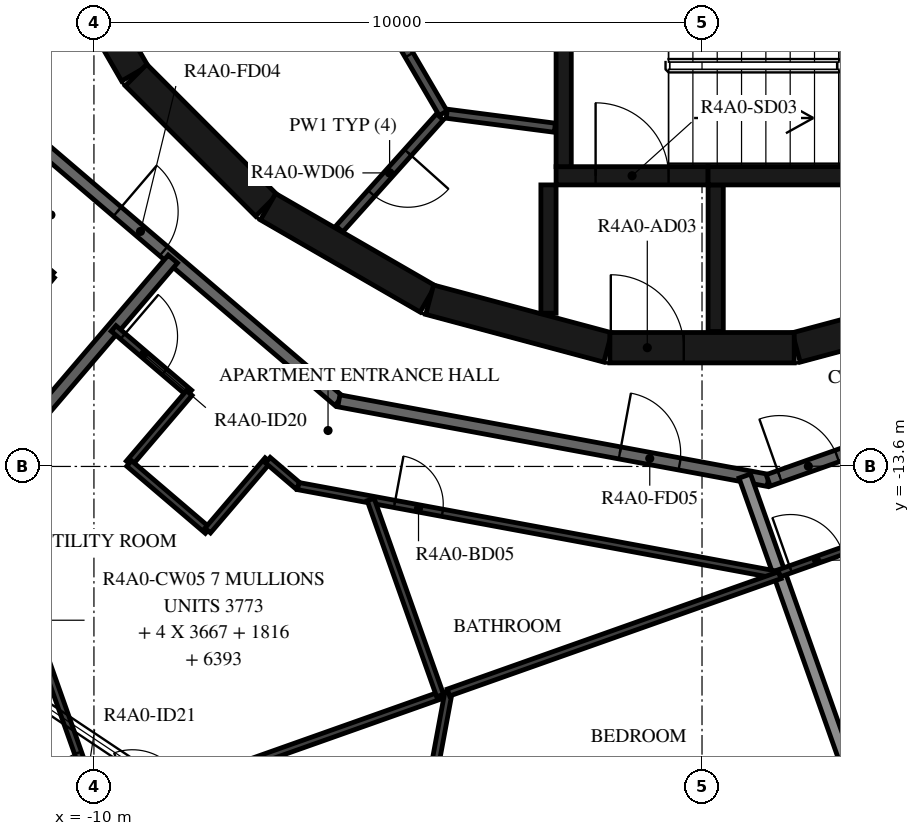
"""IFC4 building model, lengths in metres.
Left out: names, types, materials, properties, quantities, classifications, styles, units other than length and angle.
Written with IfcOpenShell. Run it as: python <this file> out.ifc"""

import sys

from ifc_helpers import new_model, si_unit, direction, frame, frame_2d, origin, place, context, subcontext, project, spatial, rectangle, extrude, element, fill, save


model = new_model("IFC4")
c1 = context("Model", 3, precision=1e-05, world=origin(), true_north=direction((0.0, 1.0)))
c2 = subcontext(c1, "Body", "Model", "MODEL_VIEW")
j1 = project(units=[si_unit("LENGTHUNIT", "METRE"), si_unit("PLANEANGLEUNIT", "RADIAN")], contexts=[c1])
p1 = place(None, origin())
s1 = spatial("IfcSite", under=j1, at=p1, CompositionType="ELEMENT")
p2 = place(p1, origin())
s2 = spatial("IfcBuilding", under=s1, at=p2, CompositionType="ELEMENT")
p3 = place(p2, frame((0.0, 0.0, 158.7)))
s3 = spatial("IfcBuildingStorey", under=s2, at=p3, CompositionType="ELEMENT", Elevation=158.7)
for number, where, z_axis, x_axis in (
    (1, (1.55, -11.643, 0.0), (0.0, 0.0, 1.0), (0.966, 0.259, 0.0)),
    (2, (-10.845, -4.51, 0.0), (0.0, 0.0, 1.0), (0.5, -0.866, 0.0)),
):
    element("IfcWall", number, at=place(p3, frame(where, z_axis=z_axis, x_axis=x_axis)), inside=s3, PredefinedType="SHEAR", context=c2, shape_type="SweptSolid", body=[
        extrude(rectangle(XDim=3.033, YDim=0.5, at=frame_2d((1.516, 0.0))), origin(), (0.0, 0.0, 1.0), 3.12),
    ])
p4 = place(p3, frame((-9.308, -7.164, 0.0), z_axis=(0.0, 0.0, 1.0), x_axis=(0.707106781187, -0.707106781187, 0.0)))
e3 = element("IfcWall", 3, at=p4, inside=s3, PredefinedType="SHEAR", context=c2, shape_type="SweptSolid", body=[
    extrude(rectangle(XDim=3.032, YDim=0.5, at=frame_2d((1.516, 0.0))), origin(), (0.0, 0.0, 1.0), 3.12),
])
for number, where, z_axis, x_axis in (
    (4, (-7.137, -9.329, 0.0), (0.0, 0.0, 1.0), (0.866, -0.5, 0.0)),
    (5, (-4.479, -10.858, 0.0), (0.0, 0.0, 1.0), (0.966, -0.259, 0.0)),
):
    element("IfcWall", number, at=place(p3, frame(where, z_axis=z_axis, x_axis=x_axis)), inside=s3, PredefinedType="SHEAR", context=c2, shape_type="SweptSolid", body=[
        extrude(rectangle(XDim=3.033, YDim=0.5, at=frame_2d((1.516, 0.0))), origin(), (0.0, 0.0, 1.0), 3.12),
    ])
p5 = place(p3, frame((-1.516, -11.647, 0.0), z_axis=(0.0, 0.0, 1.0), x_axis=(1.0, 0.0, 0.0)))
e6 = element("IfcWall", 6, at=p5, inside=s3, PredefinedType="SHEAR", context=c2, shape_type="SweptSolid", body=[
    extrude(rectangle(XDim=3.033, YDim=0.5, at=frame_2d((1.516, 0.0))), origin(), (0.0, 0.0, 1.0), 3.12),
])
p6 = place(p5, frame((0.016, 0.0, 0.0)))
e7 = element("IfcOpeningElement", 7, at=p6, cuts=e6, PredefinedType="OPENING", context=c2, shape_type="SweptSolid", body=[
    extrude(rectangle(XDim=1.2, YDim=2.1, at=frame_2d((0.6, 1.05))), frame((0.0, 0.26, 0.0), z_axis=(0.0, -1.0, 0.0), x_axis=(1.0, 0.0, 0.0)), (0.0, 0.0, 1.0), 0.52),
])
p7 = place(p3, frame((-2.275, -8.67, 0.0), z_axis=(0.0, 0.0, 1.0), x_axis=(0.0, 1.0, 0.0)))
e8 = element("IfcWall", 8, at=p7, inside=s3, PredefinedType="SHEAR", context=c2, shape_type="SweptSolid", body=[
    extrude(rectangle(XDim=3.32, YDim=0.25, at=frame_2d((1.66, 0.0))), origin(), (0.0, 0.0, 1.0), 3.12),
])
p8 = place(p3, frame((0.1, -8.82, 0.0), z_axis=(0.0, 0.0, 1.0), x_axis=(1.0, 0.0, 0.0)))
e9 = element("IfcWall", 9, at=p8, inside=s3, PredefinedType="SHEAR", context=c2, shape_type="SweptSolid", body=[
    extrude(rectangle(XDim=4.55, YDim=0.3, at=frame_2d((2.275, 0.0))), origin(), (0.0, 0.0, 1.0), 3.12),
])
p9 = place(p3, frame((-2.4, -8.82, 0.0), z_axis=(0.0, 0.0, 1.0), x_axis=(1.0, 0.0, 0.0)))
e10 = element("IfcWall", 10, at=p9, inside=s3, PredefinedType="SHEAR", context=c2, shape_type="SweptSolid", body=[
    extrude(rectangle(XDim=2.5, YDim=0.3, at=frame_2d((1.25, 0.0))), origin(), (0.0, 0.0, 1.0), 3.12),
])
p10 = place(p9, frame((0.65, 0.0, 0.0)))
e11 = element("IfcOpeningElement", 11, at=p10, cuts=e10, PredefinedType="OPENING", context=c2, shape_type="SweptSolid", body=[
    extrude(rectangle(XDim=1.2, YDim=2.1, at=frame_2d((0.6, 1.05))), frame((0.0, 0.16, 0.0), z_axis=(0.0, -1.0, 0.0), x_axis=(1.0, 0.0, 0.0)), (0.0, 0.0, 1.0), 0.32),
])
p11 = place(p3, frame((-2.525, -8.97, 0.0), z_axis=(0.0, 0.0, 1.0), x_axis=(0.0, -1.0, 0.0)))
e12 = element("IfcWall", 12, at=p11, inside=s3, PredefinedType="SHEAR", context=c2, shape_type="SweptSolid", body=[
    extrude(rectangle(XDim=2.11, YDim=0.25, at=frame_2d((1.055, 0.0))), origin(), (0.0, 0.0, 1.0), 3.12),
])
p12 = place(p3, frame((0.225, -8.97, 0.0), z_axis=(0.0, 0.0, 1.0), x_axis=(0.0, -1.0, 0.0)))
e13 = element("IfcWall", 13, at=p12, inside=s3, PredefinedType="SHEAR", context=c2, shape_type="SweptSolid", body=[
    extrude(rectangle(XDim=2.41, YDim=0.25, at=frame_2d((1.205, 0.0))), origin(), (0.0, 0.0, 1.0), 3.12),
])
p13 = place(p3, frame((-5.829, -5.102, 0.0), z_axis=(0.0, 0.0, 1.0), x_axis=(0.504480008384, -0.863423373057, 0.0)))
e14 = element("IfcWall", 14, at=p13, inside=s3, PredefinedType="PARTITIONING", context=c2, shape_type="SweptSolid", body=[
    extrude(rectangle(XDim=3.115, YDim=0.15, at=frame_2d((1.558, 0.0))), origin(), (0.0, 0.0, 1.0), 3.12),
])
p14 = place(p13, frame((1.107, 0.0, 0.0)))
e15 = element("IfcOpeningElement", 15, at=p14, cuts=e14, PredefinedType="OPENING", context=c2, shape_type="SweptSolid", body=[
    extrude(rectangle(XDim=0.9, YDim=2.1, at=frame_2d((0.45, 1.05))), frame((0.0, 0.085, 0.0), z_axis=(0.0, -1.0, 0.0), x_axis=(1.0, 0.0, 0.0)), (0.0, 0.0, 1.0), 0.17),
])
p15 = place(p3, frame((-4.311, -7.851, 0.0), z_axis=(0.0, 0.0, 1.0), x_axis=(-0.667869133096, -0.744278725383, 0.0)))
e16 = element("IfcWall", 16, at=p15, inside=s3, PredefinedType="PARTITIONING", context=c2, shape_type="SweptSolid", body=[
    extrude(rectangle(XDim=2.476, YDim=0.15, at=frame_2d((1.238, 0.0))), origin(), (0.0, 0.0, 1.0), 3.12),
])
p16 = place(p15, frame((0.788, 0.0, 0.0)))
e17 = element("IfcOpeningElement", 17, at=p16, cuts=e16, PredefinedType="OPENING", context=c2, shape_type="SweptSolid", body=[
    extrude(rectangle(XDim=0.9, YDim=2.1, at=frame_2d((0.45, 1.05))), frame((0.0, 0.085, 0.0), z_axis=(0.0, -1.0, 0.0), x_axis=(1.0, 0.0, 0.0)), (0.0, 0.0, 1.0), 0.17),
])
p17 = place(p3, frame((-4.198, -7.799, 0.0), z_axis=(0.0, 0.0, 1.0), x_axis=(0.991686747293, -0.128675542523, 0.0)))
e18 = element("IfcWall", 18, at=p17, inside=s3, PredefinedType="PARTITIONING", context=c2, shape_type="SweptSolid", body=[
    extrude(rectangle(XDim=1.793, YDim=0.15, at=frame_2d((0.896, 0.0))), origin(), (0.0, 0.0, 1.0), 3.12),
])
p18 = place(p3, frame((-10.303, -5.949, 0.0), z_axis=(0.0, 0.0, 1.0), x_axis=(-0.866021168401, -0.500007335828, 0.0)))
e19 = element("IfcWall", 19, at=p18, inside=s3, PredefinedType="STANDARD", context=c2, shape_type="SweptSolid", body=[
    extrude(rectangle(XDim=1.731, YDim=0.2, at=frame_2d((0.865, 0.0))), origin(), (0.0, 0.0, 1.0), 3.12),
])
p19 = place(p3, frame((-11.433, -7.858, 0.0), z_axis=(0.0, 0.0, 1.0), x_axis=(0.760412154545, -0.649440801937, 0.0)))
e20 = element("IfcWall", 20, at=p19, inside=s3, PredefinedType="STANDARD", context=c2, shape_type="SweptSolid", body=[
    extrude(rectangle(XDim=7.181, YDim=0.2, at=frame_2d((3.59, 0.0))), origin(), (0.0, 0.0, 1.0), 3.12),
])
p20 = place(p19, frame((2.39, 0.0, 0.0)))
e21 = element("IfcOpeningElement", 21, at=p20, cuts=e20, PredefinedType="OPENING", context=c2, shape_type="SweptSolid", body=[
    extrude(rectangle(XDim=1.0, YDim=2.1, at=frame_2d((0.5, 1.05))), frame((0.0, 0.11, 0.0), z_axis=(0.0, -1.0, 0.0), x_axis=(1.0, 0.0, 0.0)), (0.0, 0.0, 1.0), 0.22),
])
p21 = place(p3, frame((-5.972, -12.521, 0.0), z_axis=(0.0, 0.0, 1.0), x_axis=(0.983256068163, -0.18222926335, 0.0)))
e22 = element("IfcWall", 22, at=p21, inside=s3, PredefinedType="STANDARD", context=c2, shape_type="SweptSolid", body=[
    extrude(rectangle(XDim=7.181, YDim=0.2, at=frame_2d((3.59, 0.0))), origin(), (0.0, 0.0, 1.0), 3.12),
])
p22 = place(p21, frame((4.7, 0.0, 0.0)))
e23 = element("IfcOpeningElement", 23, at=p22, cuts=e22, PredefinedType="OPENING", context=c2, shape_type="SweptSolid", body=[
    extrude(rectangle(XDim=1.0, YDim=2.1, at=frame_2d((0.5, 1.05))), frame((0.0, 0.11, 0.0), z_axis=(0.0, -1.0, 0.0), x_axis=(1.0, 0.0, 0.0)), (0.0, 0.0, 1.0), 0.22),
])
p23 = place(p3, frame((1.088, -13.83, 0.0), z_axis=(0.0, 0.0, 1.0), x_axis=(0.942648397945, 0.333787354241, 0.0)))
e24 = element("IfcWall", 24, at=p23, inside=s3, PredefinedType="STANDARD", context=c2, shape_type="SweptSolid", body=[
    extrude(rectangle(XDim=7.181, YDim=0.2, at=frame_2d((3.591, 0.0))), origin(), (0.0, 0.0, 1.0), 3.12),
])
p24 = place(p23, frame((0.2, 0.0, 0.0)))
e25 = element("IfcOpeningElement", 25, at=p24, cuts=e24, PredefinedType="OPENING", context=c2, shape_type="SweptSolid", body=[
    extrude(rectangle(XDim=1.0, YDim=2.1, at=frame_2d((0.5, 1.05))), frame((0.0, 0.11, 0.0), z_axis=(0.0, -1.0, 0.0), x_axis=(1.0, 0.0, 0.0)), (0.0, 0.0, 1.0), 0.22),
])
p25 = place(p3, frame((-11.838, -13.86, 0.0), z_axis=(0.0, 0.0, 1.0), x_axis=(0.64944503311, 0.760408540831, 0.0)))
e26 = element("IfcWall", 26, at=p25, inside=s3, PredefinedType="STANDARD", context=c2, shape_type="SweptSolid", body=[
    extrude(rectangle(XDim=4.827, YDim=0.2, at=frame_2d((2.414, 0.0))), origin(), (0.0, 0.0, 1.0), 3.12),
])
p26 = place(p3, frame((2.482, -18.782, 0.0), z_axis=(0.0, 0.0, 1.0), x_axis=(-0.333807281402, 0.942641341594, 0.0)))
e27 = element("IfcWall", 27, at=p26, inside=s3, PredefinedType="STANDARD", context=c2, shape_type="SweptSolid", body=[
    extrude(rectangle(XDim=5.329, YDim=0.2, at=frame_2d((2.665, 0.0))), origin(), (0.0, 0.0, 1.0), 2.73),
])
p27 = place(p3, frame((-12.713, -8.737, 0.0), z_axis=(0.0, 0.0, 1.0), x_axis=(0.760400223405, -0.649454771517, 0.0)))
e28 = element("IfcWall", 28, at=p27, inside=s3, PredefinedType="PARTITIONING", context=c2, shape_type="SweptSolid", body=[
    extrude(rectangle(XDim=2.649, YDim=0.12, at=frame_2d((1.325, 0.0))), origin(), (0.0, 0.0, 1.0), 3.12),
])
p28 = place(p3, frame((-10.698, -10.458, 0.0), z_axis=(0.0, 0.0, 1.0), x_axis=(-0.63830561059, -0.769783052223, 0.0)))
e29 = element("IfcWall", 29, at=p28, inside=s3, PredefinedType="PARTITIONING", context=c2, shape_type="SweptSolid", body=[
    extrude(rectangle(XDim=5.131, YDim=0.12, at=frame_2d((2.565, 0.0))), origin(), (0.0, 0.0, 1.0), 3.12),
])
p29 = place(p28, frame((2.363, 0.0, 0.0)))
e30 = element("IfcOpeningElement", 30, at=p29, cuts=e29, PredefinedType="OPENING", context=c2, shape_type="SweptSolid", body=[
    extrude(rectangle(XDim=0.8, YDim=2.1, at=frame_2d((0.4, 1.05))), frame((0.0, 0.07, 0.0), z_axis=(0.0, -1.0, 0.0), x_axis=(1.0, 0.0, 0.0)), (0.0, 0.0, 1.0), 0.14),
])
p30 = place(p3, frame((-9.677, -11.33, 0.0), z_axis=(0.0, 0.0, 1.0), x_axis=(0.760372142735, -0.649487647729, 0.0)))
e31 = element("IfcWall", 31, at=p30, inside=s3, PredefinedType="PARTITIONING", context=c2, shape_type="SweptSolid", body=[
    extrude(rectangle(XDim=1.636, YDim=0.12, at=frame_2d((0.818, 0.0))), origin(), (0.0, 0.0, 1.0), 3.12),
])
p31 = place(p30, frame((0.2, 0.0, 0.0)))
e32 = element("IfcOpeningElement", 32, at=p31, cuts=e31, PredefinedType="OPENING", context=c2, shape_type="SweptSolid", body=[
    extrude(rectangle(XDim=0.9, YDim=2.1, at=frame_2d((0.45, 1.05))), frame((0.0, 0.07, 0.0), z_axis=(0.0, -1.0, 0.0), x_axis=(1.0, 0.0, 0.0)), (0.0, 0.0, 1.0), 0.14),
])
p32 = place(p3, frame((-8.433, -12.393, 0.0), z_axis=(0.0, 0.0, 1.0), x_axis=(-0.649443355674, -0.760409973482, 0.0)))
e33 = element("IfcWall", 33, at=p32, inside=s3, PredefinedType="PARTITIONING", context=c2, shape_type="SweptSolid", body=[
    extrude(rectangle(XDim=1.522, YDim=0.12, at=frame_2d((0.761, 0.0))), origin(), (0.0, 0.0, 1.0), 3.12),
])
p33 = place(p3, frame((-9.422, -13.55, 0.0), z_axis=(0.0, 0.0, 1.0), x_axis=(0.760431300628, -0.649418383652, 0.0)))
e34 = element("IfcWall", 34, at=p33, inside=s3, PredefinedType="PARTITIONING", context=c2, shape_type="SweptSolid", body=[
    extrude(rectangle(XDim=1.7, YDim=0.12, at=frame_2d((0.85, 0.0))), origin(), (0.0, 0.0, 1.0), 3.12),
])
p34 = place(p3, frame((-8.129, -14.654, 0.0), z_axis=(0.0, 0.0, 1.0), x_axis=(0.649443355674, 0.760409973482, 0.0)))
e35 = element("IfcWall", 35, at=p34, inside=s3, PredefinedType="PARTITIONING", context=c2, shape_type="SweptSolid", body=[
    extrude(rectangle(XDim=1.522, YDim=0.12, at=frame_2d((0.761, 0.0))), origin(), (0.0, 0.0, 1.0), 3.12),
])
p35 = place(p3, frame((-7.14, -13.497, 0.0), z_axis=(0.0, 0.0, 1.0), x_axis=(0.760515230334, -0.649320093967, 0.0)))
e36 = element("IfcWall", 36, at=p35, inside=s3, PredefinedType="PARTITIONING", context=c2, shape_type="SweptSolid", body=[
    extrude(rectangle(XDim=0.656, YDim=0.12, at=frame_2d((0.328, 0.0))), origin(), (0.0, 0.0, 1.0), 3.12),
])
p36 = place(p3, frame((-6.641, -13.923, 0.0), z_axis=(0.0, 0.0, 1.0), x_axis=(0.983250157272, -0.182261153912, 0.0)))
e37 = element("IfcWall", 37, at=p36, inside=s3, PredefinedType="PARTITIONING", context=c2, shape_type="SweptSolid", body=[
    extrude(rectangle(XDim=7.985, YDim=0.12, at=frame_2d((3.992, 0.0))), origin(), (0.0, 0.0, 1.0), 3.12),
])
p37 = place(p36, frame((1.612, 0.0, 0.0)))
e38 = element("IfcOpeningElement", 38, at=p37, cuts=e37, PredefinedType="OPENING", context=c2, shape_type="SweptSolid", body=[
    extrude(rectangle(XDim=0.8, YDim=2.1, at=frame_2d((0.4, 1.05))), frame((0.0, 0.07, 0.0), z_axis=(0.0, -1.0, 0.0), x_axis=(1.0, 0.0, 0.0)), (0.0, 0.0, 1.0), 0.14),
])
p38 = place(p3, frame((-9.895, -19.346, 0.0), z_axis=(0.0, 0.0, 1.0), x_axis=(-0.333781129158, 0.942650602195, 0.0)))
e39 = element("IfcWall", 39, at=p38, inside=s3, PredefinedType="PARTITIONING", context=c2, shape_type="SweptSolid", body=[
    extrude(rectangle(XDim=5.819, YDim=0.12, at=frame_2d((2.91, 0.0))), origin(), (0.0, 0.0, 1.0), 3.12),
])
p39 = place(p38, frame((0.2, 0.0, 0.0)))
e40 = element("IfcOpeningElement", 40, at=p39, cuts=e39, PredefinedType="OPENING", context=c2, shape_type="SweptSolid", body=[
    extrude(rectangle(XDim=0.9, YDim=2.1, at=frame_2d((0.45, 1.05))), frame((0.0, 0.07, 0.0), z_axis=(0.0, -1.0, 0.0), x_axis=(1.0, 0.0, 0.0)), (0.0, 0.0, 1.0), 0.14),
])
p40 = place(p3, frame((-12.015, -20.096, 0.0), z_axis=(0.0, 0.0, 1.0), x_axis=(0.942638718556, 0.333814688531, 0.0)))
e41 = element("IfcWall", 41, at=p40, inside=s3, PredefinedType="PARTITIONING", context=c2, shape_type="SweptSolid", body=[
    extrude(rectangle(XDim=8.216, YDim=0.12, at=frame_2d((4.108, 0.0))), origin(), (0.0, 0.0, 1.0), 3.12),
])
p41 = place(p40, frame((2.809, 0.0, 0.0)))
e42 = element("IfcOpeningElement", 42, at=p41, cuts=e41, PredefinedType="OPENING", context=c2, shape_type="SweptSolid", body=[
    extrude(rectangle(XDim=0.9, YDim=2.1, at=frame_2d((0.45, 1.05))), frame((0.0, 0.07, 0.0), z_axis=(0.0, -1.0, 0.0), x_axis=(1.0, 0.0, 0.0)), (0.0, 0.0, 1.0), 0.14),
])
p42 = place(p40, frame((0.2, 0.0, 0.0)))
e43 = element("IfcOpeningElement", 43, at=p42, cuts=e41, PredefinedType="OPENING", context=c2, shape_type="SweptSolid", body=[
    extrude(rectangle(XDim=0.9, YDim=2.1, at=frame_2d((0.45, 1.05))), frame((0.0, 0.07, 0.0), z_axis=(0.0, -1.0, 0.0), x_axis=(1.0, 0.0, 0.0)), (0.0, 0.0, 1.0), 0.14),
])
p43 = place(p3, frame((-4.308, -17.367, 0.0), z_axis=(0.0, 0.0, 1.0), x_axis=(-0.333802202677, 0.942643140052, 0.0)))
e44 = element("IfcWall", 44, at=p43, inside=s3, PredefinedType="PARTITIONING", context=c2, shape_type="SweptSolid", body=[
    extrude(rectangle(XDim=3.419, YDim=0.12, at=frame_2d((1.709, 0.0))), origin(), (0.0, 0.0, 1.0), 3.12),
])
p44 = place(p3, frame((-4.927, -21.406, 0.0), z_axis=(0.0, 0.0, 1.0), x_axis=(0.182238575099, 0.983254342348, 0.0)))
e45 = element("IfcWall", 45, at=p44, inside=s3, PredefinedType="PARTITIONING", context=c2, shape_type="SweptSolid", body=[
    extrude(rectangle(XDim=4.157, YDim=0.12, at=frame_2d((2.079, 0.0))), origin(), (0.0, 0.0, 1.0), 3.12),
])
p45 = place(p44, frame((0.4, 0.0, 0.0)))
e46 = element("IfcOpeningElement", 46, at=p45, cuts=e45, PredefinedType="OPENING", context=c2, shape_type="SweptSolid", body=[
    extrude(rectangle(XDim=0.9, YDim=2.1, at=frame_2d((0.45, 1.05))), frame((0.0, 0.07, 0.0), z_axis=(0.0, -1.0, 0.0), x_axis=(1.0, 0.0, 0.0)), (0.0, 0.0, 1.0), 0.14),
])
p46 = place(p3, frame((-4.17, -17.318, 0.0), z_axis=(0.0, 0.0, 1.0), x_axis=(0.942641343532, 0.333807275931, 0.0)))
e47 = element("IfcWall", 47, at=p46, inside=s3, PredefinedType="PARTITIONING", context=c2, shape_type="SweptSolid", body=[
    extrude(rectangle(XDim=5.781, YDim=0.12, at=frame_2d((2.891, 0.0))), origin(), (0.0, 0.0, 1.0), 3.12),
])
p47 = place(p3, frame((1.269, -15.357, 0.0), z_axis=(0.0, 0.0, 1.0), x_axis=(0.942639442898, 0.333812643101, 0.0)))
e48 = element("IfcWall", 48, at=p47, inside=s3, PredefinedType="PARTITIONING", context=c2, shape_type="SweptSolid", body=[
    extrude(rectangle(XDim=7.86, YDim=0.12, at=frame_2d((3.93, 0.0))), origin(), (0.0, 0.0, 1.0), 3.12),
])
p48 = place(p47, frame((0.2, 0.0, 0.0)))
e49 = element("IfcOpeningElement", 49, at=p48, cuts=e48, PredefinedType="OPENING", context=c2, shape_type="SweptSolid", body=[
    extrude(rectangle(XDim=0.9, YDim=2.1, at=frame_2d((0.45, 1.05))), frame((0.0, 0.07, 0.0), z_axis=(0.0, -1.0, 0.0), x_axis=(1.0, 0.0, 0.0)), (0.0, 0.0, 1.0), 0.14),
])
p49 = place(p10, origin())
e50 = element("IfcDoor", 50, at=p49, inside=s3, OperationType="SINGLE_SWING_LEFT", PredefinedType="DOOR", context=c2, shape_type="SweptSolid", body=[
    extrude(rectangle(XDim=1.2, YDim=2.1, at=frame_2d((0.6, 1.05))), frame((0.0, 0.025, 0.0), z_axis=(0.0, -1.0, 0.0), x_axis=(1.0, 0.0, 0.0)), (0.0, 0.0, 1.0), 0.05),
])
fill(e11, e50)
p50 = place(p6, origin())
e51 = element("IfcDoor", 51, at=p50, inside=s3, OperationType="SINGLE_SWING_RIGHT", PredefinedType="DOOR", context=c2, shape_type="SweptSolid", body=[
    extrude(rectangle(XDim=1.2, YDim=2.1, at=frame_2d((0.6, 1.05))), frame((0.0, 0.025, 0.0), z_axis=(0.0, -1.0, 0.0), x_axis=(1.0, 0.0, 0.0)), (0.0, 0.0, 1.0), 0.05),
])
fill(e7, e51)
p51 = place(p16, origin())
e52 = element("IfcDoor", 52, at=p51, inside=s3, OperationType="SINGLE_SWING_RIGHT", PredefinedType="DOOR", context=c2, shape_type="SweptSolid", body=[
    extrude(rectangle(XDim=0.9, YDim=2.1, at=frame_2d((0.45, 1.05))), frame((0.0, 0.025, 0.0), z_axis=(0.0, -1.0, 0.0), x_axis=(1.0, 0.0, 0.0)), (0.0, 0.0, 1.0), 0.05),
])
fill(e17, e52)
p52 = place(p14, origin())
e53 = element("IfcDoor", 53, at=p52, inside=s3, OperationType="SINGLE_SWING_LEFT", PredefinedType="DOOR", context=c2, shape_type="SweptSolid", body=[
    extrude(rectangle(XDim=0.9, YDim=2.1, at=frame_2d((0.45, 1.05))), frame((0.0, 0.025, 0.0), z_axis=(0.0, -1.0, 0.0), x_axis=(1.0, 0.0, 0.0)), (0.0, 0.0, 1.0), 0.05),
])
fill(e15, e53)
p53 = place(p20, origin())
e54 = element("IfcDoor", 54, at=p53, inside=s3, OperationType="SINGLE_SWING_RIGHT", PredefinedType="DOOR", context=c2, shape_type="SweptSolid", body=[
    extrude(rectangle(XDim=1.0, YDim=2.1, at=frame_2d((0.5, 1.05))), frame((0.0, 0.025, 0.0), z_axis=(0.0, -1.0, 0.0), x_axis=(1.0, 0.0, 0.0)), (0.0, 0.0, 1.0), 0.05),
])
fill(e21, e54)
p54 = place(p22, origin())
e55 = element("IfcDoor", 55, at=p54, inside=s3, OperationType="SINGLE_SWING_LEFT", PredefinedType="DOOR", context=c2, shape_type="SweptSolid", body=[
    extrude(rectangle(XDim=1.0, YDim=2.1, at=frame_2d((0.5, 1.05))), frame((0.0, 0.025, 0.0), z_axis=(0.0, -1.0, 0.0), x_axis=(1.0, 0.0, 0.0)), (0.0, 0.0, 1.0), 0.05),
])
fill(e23, e55)
p55 = place(p31, origin())
e56 = element("IfcDoor", 56, at=p55, inside=s3, OperationType="SINGLE_SWING_LEFT", PredefinedType="DOOR", context=c2, shape_type="SweptSolid", body=[
    extrude(rectangle(XDim=0.9, YDim=2.1, at=frame_2d((0.45, 1.05))), frame((0.0, 0.025, 0.0), z_axis=(0.0, -1.0, 0.0), x_axis=(1.0, 0.0, 0.0)), (0.0, 0.0, 1.0), 0.05),
])
fill(e32, e56)
p56 = place(p37, origin())
e57 = element("IfcDoor", 57, at=p56, inside=s3, OperationType="SINGLE_SWING_LEFT", PredefinedType="DOOR", context=c2, shape_type="SweptSolid", body=[
    extrude(rectangle(XDim=0.8, YDim=2.1, at=frame_2d((0.4, 1.05))), frame((0.0, 0.025, 0.0), z_axis=(0.0, -1.0, 0.0), x_axis=(1.0, 0.0, 0.0)), (0.0, 0.0, 1.0), 0.05),
])
fill(e38, e57)
p57 = place(p39, origin())
e58 = element("IfcDoor", 58, at=p57, inside=s3, OperationType="SINGLE_SWING_LEFT", PredefinedType="DOOR", context=c2, shape_type="SweptSolid", body=[
    extrude(rectangle(XDim=0.9, YDim=2.1, at=frame_2d((0.45, 1.05))), frame((0.0, 0.025, 0.0), z_axis=(0.0, -1.0, 0.0), x_axis=(1.0, 0.0, 0.0)), (0.0, 0.0, 1.0), 0.05),
])
fill(e40, e58)
p58 = place(p24, origin())
e59 = element("IfcDoor", 59, at=p58, inside=s3, OperationType="SINGLE_SWING_LEFT", PredefinedType="DOOR", context=c2, shape_type="SweptSolid", body=[
    extrude(rectangle(XDim=1.0, YDim=2.1, at=frame_2d((0.5, 1.05))), frame((0.0, 0.025, 0.0), z_axis=(0.0, -1.0, 0.0), x_axis=(1.0, 0.0, 0.0)), (0.0, 0.0, 1.0), 0.05),
])
fill(e25, e59)
p59 = place(p48, origin())
e60 = element("IfcDoor", 60, at=p59, inside=s3, OperationType="SINGLE_SWING_LEFT", PredefinedType="DOOR", context=c2, shape_type="SweptSolid", body=[
    extrude(rectangle(XDim=0.9, YDim=2.1, at=frame_2d((0.45, 1.05))), frame((0.0, 0.025, 0.0), z_axis=(0.0, -1.0, 0.0), x_axis=(1.0, 0.0, 0.0)), (0.0, 0.0, 1.0), 0.05),
])
fill(e49, e60)
save(model, sys.argv[1])
